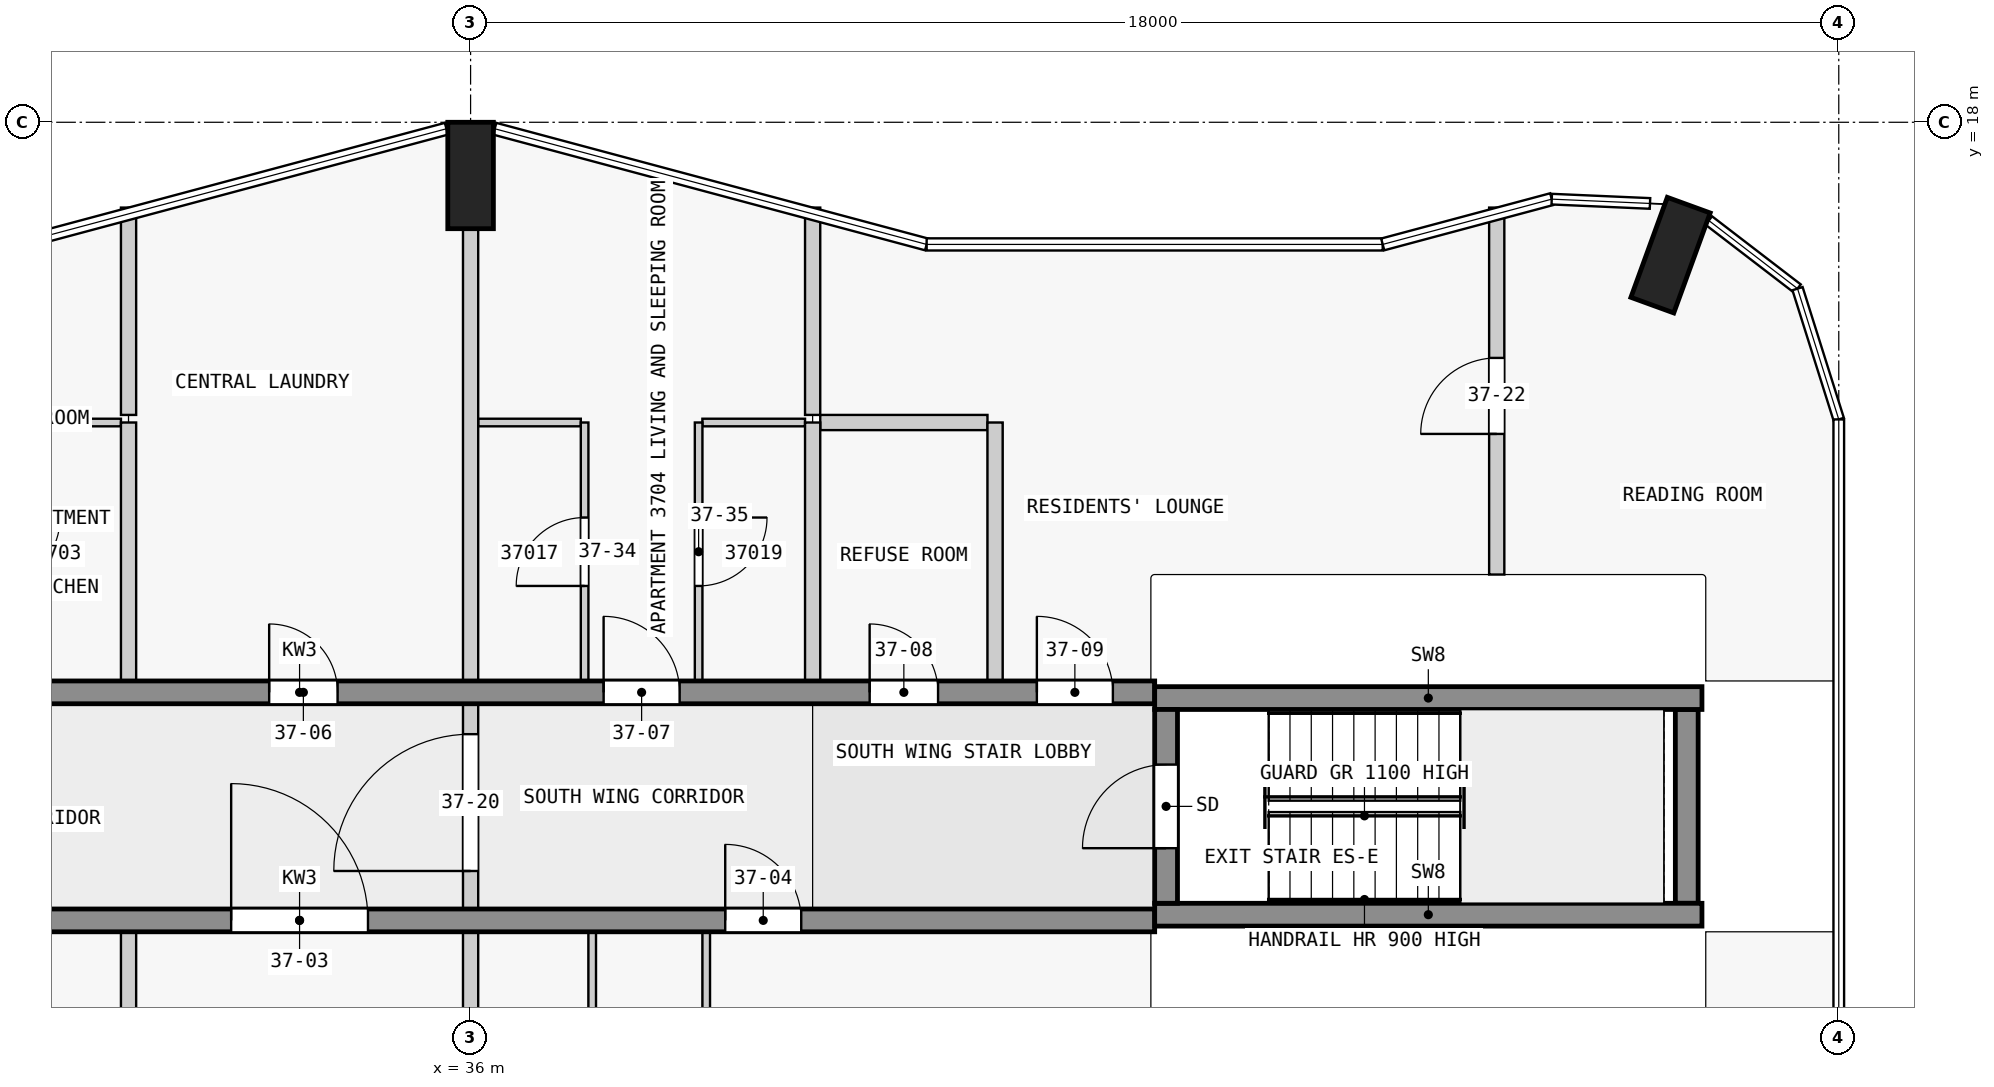
"""IFC4 building model, lengths in metres.
Left out: names, types, materials, properties, quantities, classifications, styles, units other than length and angle.
Written with IfcOpenShell. Run it as: python <this file> out.ifc"""

import sys

from ifc_helpers import new_model, si_unit, direction, frame, frame_2d, origin, origin_2d, place, context, subcontext, project, spatial, rectangle, extrude, element, fill, save


model = new_model("IFC4")
c1 = context("Model", 3, precision=1e-05, world=origin(), true_north=direction((0.0, 1.0)))
c2 = subcontext(c1, "Body", "Model", "MODEL_VIEW")
j1 = project(units=[si_unit("LENGTHUNIT", "METRE"), si_unit("PLANEANGLEUNIT", "RADIAN")], contexts=[c1])
p1 = place(None, origin())
s1 = spatial("IfcSite", under=j1, at=p1, CompositionType="ELEMENT")
p2 = place(p1, origin())
s2 = spatial("IfcBuilding", under=s1, at=p2, CompositionType="ELEMENT")
p3 = place(p2, frame((0.0, 0.0, 146.4)))
s3 = spatial("IfcBuildingStorey", under=s2, at=p3, CompositionType="ELEMENT", Elevation=146.4)
for number, where, z_axis, x_axis in (
    (1, (51.787, 16.252, 0.0), (0.0, 0.0, 1.0), (-0.94, 0.342, 0.0)),
    (2, (36.0, 17.3, 0.0), (0.0, 0.0, 1.0), (1.0, 0.0, 0.0)),
):
    element("IfcColumn", number, at=place(p3, frame(where, z_axis=z_axis, x_axis=x_axis)), inside=s3, PredefinedType="COLUMN", context=c2, shape_type="SweptSolid", body=[
        extrude(rectangle(XDim=0.6, YDim=1.4, at=origin_2d()), origin(), (0.0, 0.0, 1.0), 3.5),
    ])
p4 = place(p3, frame((45.15, 7.725, 0.0), z_axis=(0.0, 0.0, 1.0), x_axis=(0.0, 1.0, 0.0)))
e3 = element("IfcWall", 3, at=p4, inside=s3, PredefinedType="SHEAR", context=c2, shape_type="SweptSolid", body=[
    extrude(rectangle(XDim=2.55, YDim=0.3, at=frame_2d((1.275, 0.0))), origin(), (0.0, 0.0, 1.0), 3.5),
])
p5 = place(p4, frame((0.725, 0.0, 0.0)))
e4 = element("IfcOpeningElement", 4, at=p5, cuts=e3, PredefinedType="OPENING", context=c2, shape_type="SweptSolid", body=[
    extrude(rectangle(XDim=1.1, YDim=2.1, at=frame_2d((0.55, 1.05))), frame((0.0, 0.16, 0.0), z_axis=(0.0, -1.0, 0.0), x_axis=(1.0, 0.0, 0.0)), (0.0, 0.0, 1.0), 0.32),
])
p6 = place(p3, frame((52.0, 7.725, 0.0), z_axis=(0.0, 0.0, 1.0), x_axis=(0.0, 1.0, 0.0)))
e5 = element("IfcWall", 5, at=p6, inside=s3, PredefinedType="SHEAR", context=c2, shape_type="SweptSolid", body=[
    extrude(rectangle(XDim=2.55, YDim=0.3, at=frame_2d((1.275, 0.0))), origin(), (0.0, 0.0, 1.0), 3.5),
])
for number, where, z_axis, x_axis in (
    (6, (45.0, 7.575, 0.0), (0.0, 0.0, 1.0), (1.0, 0.0, 0.0)),
    (7, (45.0, 10.425, 0.0), (0.0, 0.0, 1.0), (1.0, 0.0, 0.0)),
):
    element("IfcWall", number, at=place(p3, frame(where, z_axis=z_axis, x_axis=x_axis)), inside=s3, PredefinedType="SHEAR", context=c2, shape_type="SweptSolid", body=[
        extrude(rectangle(XDim=7.2, YDim=0.3, at=frame_2d((3.6, 0.0))), origin(), (0.0, 0.0, 1.0), 3.5),
    ])
p7 = place(p3, frame((22.5, 7.5, 0.0), z_axis=(0.0, 0.0, 1.0), x_axis=(1.0, 0.0, 0.0)))
e8 = element("IfcWall", 8, at=p7, inside=s3, PredefinedType="SHEAR", context=c2, shape_type="SweptSolid", body=[
    extrude(rectangle(XDim=22.5, YDim=0.3, at=frame_2d((11.25, 0.0))), origin(), (0.0, 0.0, 1.0), 3.25),
])
p8 = place(p7, frame((1.75, 0.0, 0.0)))
e9 = element("IfcOpeningElement", 9, at=p8, cuts=e8, PredefinedType="OPENING", context=c2, shape_type="SweptSolid", body=[
    extrude(rectangle(XDim=1.0, YDim=2.1, at=frame_2d((0.5, 1.05))), frame((0.0, 0.16, 0.0), z_axis=(0.0, -1.0, 0.0), x_axis=(1.0, 0.0, 0.0)), (0.0, 0.0, 1.0), 0.32),
])
p9 = place(p7, frame((6.25, 0.0, 0.0)))
e10 = element("IfcOpeningElement", 10, at=p9, cuts=e8, PredefinedType="OPENING", context=c2, shape_type="SweptSolid", body=[
    extrude(rectangle(XDim=1.0, YDim=2.1, at=frame_2d((0.5, 1.05))), frame((0.0, 0.16, 0.0), z_axis=(0.0, -1.0, 0.0), x_axis=(1.0, 0.0, 0.0)), (0.0, 0.0, 1.0), 0.32),
])
p10 = place(p7, frame((10.35, 0.0, 0.0)))
e11 = element("IfcOpeningElement", 11, at=p10, cuts=e8, PredefinedType="OPENING", context=c2, shape_type="SweptSolid", body=[
    extrude(rectangle(XDim=1.8, YDim=2.1, at=frame_2d((0.9, 1.05))), frame((0.0, 0.16, 0.0), z_axis=(0.0, -1.0, 0.0), x_axis=(1.0, 0.0, 0.0)), (0.0, 0.0, 1.0), 0.32),
])
p11 = place(p7, frame((16.85, 0.0, 0.0)))
e12 = element("IfcOpeningElement", 12, at=p11, cuts=e8, PredefinedType="OPENING", context=c2, shape_type="SweptSolid", body=[
    extrude(rectangle(XDim=1.0, YDim=2.1, at=frame_2d((0.5, 1.05))), frame((0.0, 0.16, 0.0), z_axis=(0.0, -1.0, 0.0), x_axis=(1.0, 0.0, 0.0)), (0.0, 0.0, 1.0), 0.32),
])
p12 = place(p3, frame((22.5, 10.5, 0.0), z_axis=(0.0, 0.0, 1.0), x_axis=(1.0, 0.0, 0.0)))
e13 = element("IfcWall", 13, at=p12, inside=s3, PredefinedType="SHEAR", context=c2, shape_type="SweptSolid", body=[
    extrude(rectangle(XDim=22.5, YDim=0.3, at=frame_2d((11.25, 0.0))), origin(), (0.0, 0.0, 1.0), 3.25),
])
p13 = place(p12, frame((4.05, 0.0, 0.0)))
e14 = element("IfcOpeningElement", 14, at=p13, cuts=e13, PredefinedType="OPENING", context=c2, shape_type="SweptSolid", body=[
    extrude(rectangle(XDim=1.0, YDim=2.1, at=frame_2d((0.5, 1.05))), frame((0.0, 0.16, 0.0), z_axis=(0.0, -1.0, 0.0), x_axis=(1.0, 0.0, 0.0)), (0.0, 0.0, 1.0), 0.32),
])
p14 = place(p12, frame((10.85, 0.0, 0.0)))
e15 = element("IfcOpeningElement", 15, at=p14, cuts=e13, PredefinedType="OPENING", context=c2, shape_type="SweptSolid", body=[
    extrude(rectangle(XDim=0.9, YDim=2.1, at=frame_2d((0.45, 1.05))), frame((0.0, 0.16, 0.0), z_axis=(0.0, -1.0, 0.0), x_axis=(1.0, 0.0, 0.0)), (0.0, 0.0, 1.0), 0.32),
])
p15 = place(p12, frame((15.25, 0.0, 0.0)))
e16 = element("IfcOpeningElement", 16, at=p15, cuts=e13, PredefinedType="OPENING", context=c2, shape_type="SweptSolid", body=[
    extrude(rectangle(XDim=1.0, YDim=2.1, at=frame_2d((0.5, 1.05))), frame((0.0, 0.16, 0.0), z_axis=(0.0, -1.0, 0.0), x_axis=(1.0, 0.0, 0.0)), (0.0, 0.0, 1.0), 0.32),
])
p16 = place(p12, frame((18.75, 0.0, 0.0)))
e17 = element("IfcOpeningElement", 17, at=p16, cuts=e13, PredefinedType="OPENING", context=c2, shape_type="SweptSolid", body=[
    extrude(rectangle(XDim=0.9, YDim=2.1, at=frame_2d((0.45, 1.05))), frame((0.0, 0.16, 0.0), z_axis=(0.0, -1.0, 0.0), x_axis=(1.0, 0.0, 0.0)), (0.0, 0.0, 1.0), 0.32),
])
p17 = place(p12, frame((20.95, 0.0, 0.0)))
e18 = element("IfcOpeningElement", 18, at=p17, cuts=e13, PredefinedType="OPENING", context=c2, shape_type="SweptSolid", body=[
    extrude(rectangle(XDim=1.0, YDim=2.1, at=frame_2d((0.5, 1.05))), frame((0.0, 0.16, 0.0), z_axis=(0.0, -1.0, 0.0), x_axis=(1.0, 0.0, 0.0)), (0.0, 0.0, 1.0), 0.32),
])
p18 = place(p3, frame((31.4, 14.05, 0.0), z_axis=(0.0, 0.0, 1.0), x_axis=(-1.0, 0.0, 0.0)))
e19 = element("IfcWall", 19, at=p18, inside=s3, PredefinedType="PARTITIONING", context=c2, shape_type="SweptSolid", body=[
    extrude(rectangle(XDim=1.65, YDim=0.1, at=frame_2d((0.825, 0.0))), origin(), (0.0, 0.0, 1.0), 3.25),
])
for number, where, z_axis, x_axis in (
    (20, (37.45, 14.05, 0.0), (0.0, 0.0, 1.0), (-1.0, 0.0, 0.0)),
    (21, (40.4, 14.05, 0.0), (0.0, 0.0, 1.0), (-1.0, 0.0, 0.0)),
):
    element("IfcWall", number, at=place(p3, frame(where, z_axis=z_axis, x_axis=x_axis)), inside=s3, PredefinedType="PARTITIONING", context=c2, shape_type="SweptSolid", body=[
        extrude(rectangle(XDim=1.35, YDim=0.1, at=frame_2d((0.675, 0.0))), origin(), (0.0, 0.0, 1.0), 3.25),
    ])
p19 = place(p3, frame((42.8, 14.05, 0.0), z_axis=(0.0, 0.0, 1.0), x_axis=(-1.0, 0.0, 0.0)))
e22 = element("IfcWall", 22, at=p19, inside=s3, PredefinedType="PARTITIONING", context=c2, shape_type="SweptSolid", body=[
    extrude(rectangle(XDim=2.2, YDim=0.2, at=frame_2d((1.1, 0.0))), origin(), (0.0, 0.0, 1.0), 3.25),
])
p20 = place(p3, frame((31.5, 16.878, 0.0), z_axis=(0.0, 0.0, 1.0), x_axis=(0.0, -1.0, 0.0)))
e23 = element("IfcWall", 23, at=p20, inside=s3, PredefinedType="PARTITIONING", context=c2, shape_type="SweptSolid", body=[
    extrude(rectangle(XDim=2.728, YDim=0.2, at=frame_2d((1.364, 0.0))), origin(), (0.0, 0.0, 1.0), 3.25),
])
for number, where, z_axis, x_axis in (
    (24, (31.5, 3.95, 0.0), (0.0, 0.0, 1.0), (0.0, 1.0, 0.0)),
    (25, (31.5, 10.65, 0.0), (0.0, 0.0, 1.0), (0.0, 1.0, 0.0)),
):
    element("IfcWall", number, at=place(p3, frame(where, z_axis=z_axis, x_axis=x_axis)), inside=s3, PredefinedType="PARTITIONING", context=c2, shape_type="SweptSolid", body=[
        extrude(rectangle(XDim=3.4, YDim=0.2, at=frame_2d((1.7, 0.0))), origin(), (0.0, 0.0, 1.0), 3.25),
    ])
for number, where, z_axis, x_axis in (
    (26, (36.0, 1.4, 0.0), (0.0, 0.0, 1.0), (0.0, 1.0, 0.0)),
    (27, (36.0, 10.65, 0.0), (0.0, 0.0, 1.0), (0.0, 1.0, 0.0)),
):
    element("IfcWall", number, at=place(p3, frame(where, z_axis=z_axis, x_axis=x_axis)), inside=s3, PredefinedType="PARTITIONING", context=c2, shape_type="SweptSolid", body=[
        extrude(rectangle(XDim=5.95, YDim=0.2, at=frame_2d((2.975, 0.0))), origin(), (0.0, 0.0, 1.0), 3.25),
    ])
p21 = place(p3, frame((37.5, 10.65, 0.0), z_axis=(0.0, 0.0, 1.0), x_axis=(0.0, 1.0, 0.0)))
e28 = element("IfcWall", 28, at=p21, inside=s3, PredefinedType="PARTITIONING", context=c2, shape_type="SweptSolid", body=[
    extrude(rectangle(XDim=3.4, YDim=0.1, at=frame_2d((1.7, 0.0))), origin(), (0.0, 0.0, 1.0), 3.25),
])
p22 = place(p21, frame((1.25, 0.0, 0.0)))
e29 = element("IfcOpeningElement", 29, at=p22, cuts=e28, PredefinedType="OPENING", context=c2, shape_type="SweptSolid", body=[
    extrude(rectangle(XDim=0.9, YDim=2.1, at=frame_2d((0.45, 1.05))), frame((0.0, 0.06, 0.0), z_axis=(0.0, -1.0, 0.0), x_axis=(1.0, 0.0, 0.0)), (0.0, 0.0, 1.0), 0.12),
])
p23 = place(p3, frame((37.6, 3.95, 0.0), z_axis=(0.0, 0.0, 1.0), x_axis=(0.0, 1.0, 0.0)))
e30 = element("IfcWall", 30, at=p23, inside=s3, PredefinedType="PARTITIONING", context=c2, shape_type="SweptSolid", body=[
    extrude(rectangle(XDim=3.4, YDim=0.1, at=frame_2d((1.7, 0.0))), origin(), (0.0, 0.0, 1.0), 3.25),
])
p24 = place(p3, frame((39.0, 14.05, 0.0), z_axis=(0.0, 0.0, 1.0), x_axis=(0.0, -1.0, 0.0)))
e31 = element("IfcWall", 31, at=p24, inside=s3, PredefinedType="PARTITIONING", context=c2, shape_type="SweptSolid", body=[
    extrude(rectangle(XDim=3.4, YDim=0.1, at=frame_2d((1.7, 0.0))), origin(), (0.0, 0.0, 1.0), 3.25),
])
p25 = place(p24, frame((1.25, 0.0, 0.0)))
e32 = element("IfcOpeningElement", 32, at=p25, cuts=e31, PredefinedType="OPENING", context=c2, shape_type="SweptSolid", body=[
    extrude(rectangle(XDim=0.9, YDim=2.1, at=frame_2d((0.45, 1.05))), frame((0.0, 0.06, 0.0), z_axis=(0.0, -1.0, 0.0), x_axis=(1.0, 0.0, 0.0)), (0.0, 0.0, 1.0), 0.12),
])
p26 = place(p3, frame((39.1, 3.95, 0.0), z_axis=(0.0, 0.0, 1.0), x_axis=(0.0, 1.0, 0.0)))
e33 = element("IfcWall", 33, at=p26, inside=s3, PredefinedType="PARTITIONING", context=c2, shape_type="SweptSolid", body=[
    extrude(rectangle(XDim=3.4, YDim=0.1, at=frame_2d((1.7, 0.0))), origin(), (0.0, 0.0, 1.0), 3.25),
])
p27 = place(p26, frame((1.25, 0.0, 0.0)))
e34 = element("IfcOpeningElement", 34, at=p27, cuts=e33, PredefinedType="OPENING", context=c2, shape_type="SweptSolid", body=[
    extrude(rectangle(XDim=0.9, YDim=2.1, at=frame_2d((0.45, 1.05))), frame((0.0, 0.06, 0.0), z_axis=(0.0, -1.0, 0.0), x_axis=(1.0, 0.0, 0.0)), (0.0, 0.0, 1.0), 0.12),
])
p28 = place(p3, frame((40.5, 16.878, 0.0), z_axis=(0.0, 0.0, 1.0), x_axis=(0.0, -1.0, 0.0)))
e35 = element("IfcWall", 35, at=p28, inside=s3, PredefinedType="PARTITIONING", context=c2, shape_type="SweptSolid", body=[
    extrude(rectangle(XDim=2.728, YDim=0.2, at=frame_2d((1.364, 0.0))), origin(), (0.0, 0.0, 1.0), 3.25),
])
for number, where, z_axis, x_axis in (
    (36, (40.5, 10.65, 0.0), (0.0, 0.0, 1.0), (0.0, 1.0, 0.0)),
    (37, (42.9, 10.65, 0.0), (0.0, 0.0, 1.0), (0.0, 1.0, 0.0)),
):
    element("IfcWall", number, at=place(p3, frame(where, z_axis=z_axis, x_axis=x_axis)), inside=s3, PredefinedType="PARTITIONING", context=c2, shape_type="SweptSolid", body=[
        extrude(rectangle(XDim=3.4, YDim=0.2, at=frame_2d((1.7, 0.0))), origin(), (0.0, 0.0, 1.0), 3.25),
    ])
p29 = place(p3, frame((49.5, 12.05, 0.0), z_axis=(0.0, 0.0, 1.0), x_axis=(0.0, 1.0, 0.0)))
e38 = element("IfcWall", 38, at=p29, inside=s3, PredefinedType="PARTITIONING", context=c2, shape_type="SweptSolid", body=[
    extrude(rectangle(XDim=4.828, YDim=0.2, at=frame_2d((2.414, 0.0))), origin(), (0.0, 0.0, 1.0), 3.25),
])
p30 = place(p29, frame((1.85, 0.0, 0.0)))
e39 = element("IfcOpeningElement", 39, at=p30, cuts=e38, PredefinedType="OPENING", context=c2, shape_type="SweptSolid", body=[
    extrude(rectangle(XDim=1.0, YDim=2.1, at=frame_2d((0.5, 1.05))), frame((0.0, 0.11, 0.0), z_axis=(0.0, -1.0, 0.0), x_axis=(1.0, 0.0, 0.0)), (0.0, 0.0, 1.0), 0.22),
])
p31 = place(p3, frame((36.0, 7.45, 0.0), z_axis=(0.0, 0.0, 1.0), x_axis=(0.0, 1.0, 0.0)))
e40 = element("IfcWall", 40, at=p31, inside=s3, PredefinedType="PARTITIONING", context=c2, shape_type="SweptSolid", body=[
    extrude(rectangle(XDim=3.1, YDim=0.2, at=frame_2d((1.55, 0.0))), origin(), (0.0, 0.0, 1.0), 3.25),
])
p32 = place(p31, frame((0.7, 0.0, 0.0)))
e41 = element("IfcOpeningElement", 41, at=p32, cuts=e40, PredefinedType="OPENING", context=c2, shape_type="SweptSolid", body=[
    extrude(rectangle(XDim=1.8, YDim=2.1, at=frame_2d((0.9, 1.05))), frame((0.0, 0.11, 0.0), z_axis=(0.0, -1.0, 0.0), x_axis=(1.0, 0.0, 0.0)), (0.0, 0.0, 1.0), 0.22),
])
p33 = place(p5, origin())
e42 = element("IfcDoor", 42, at=p33, inside=s3, OperationType="SINGLE_SWING_LEFT", PredefinedType="DOOR", context=c2, shape_type="SweptSolid", body=[
    extrude(rectangle(XDim=1.1, YDim=2.1, at=frame_2d((0.55, 1.05))), frame((0.0, 0.025, 0.0), z_axis=(0.0, -1.0, 0.0), x_axis=(1.0, 0.0, 0.0)), (0.0, 0.0, 1.0), 0.05),
])
fill(e4, e42)
p34 = place(p10, origin())
e43 = element("IfcDoor", 43, at=p34, inside=s3, OperationType="SINGLE_SWING_LEFT", PredefinedType="DOOR", context=c2, shape_type="SweptSolid", body=[
    extrude(rectangle(XDim=1.8, YDim=2.1, at=frame_2d((0.9, 1.05))), frame((0.0, 0.025, 0.0), z_axis=(0.0, -1.0, 0.0), x_axis=(1.0, 0.0, 0.0)), (0.0, 0.0, 1.0), 0.05),
])
fill(e11, e43)
p35 = place(p11, origin())
e44 = element("IfcDoor", 44, at=p35, inside=s3, OperationType="SINGLE_SWING_RIGHT", PredefinedType="DOOR", context=c2, shape_type="SweptSolid", body=[
    extrude(rectangle(XDim=1.0, YDim=2.1, at=frame_2d((0.5, 1.05))), frame((0.0, 0.025, 0.0), z_axis=(0.0, -1.0, 0.0), x_axis=(1.0, 0.0, 0.0)), (0.0, 0.0, 1.0), 0.05),
])
fill(e12, e44)
p36 = place(p14, origin())
e45 = element("IfcDoor", 45, at=p36, inside=s3, OperationType="SINGLE_SWING_RIGHT", PredefinedType="DOOR", context=c2, shape_type="SweptSolid", body=[
    extrude(rectangle(XDim=0.9, YDim=2.1, at=frame_2d((0.45, 1.05))), frame((0.0, 0.025, 0.0), z_axis=(0.0, -1.0, 0.0), x_axis=(1.0, 0.0, 0.0)), (0.0, 0.0, 1.0), 0.05),
])
fill(e15, e45)
p37 = place(p15, origin())
e46 = element("IfcDoor", 46, at=p37, inside=s3, OperationType="SINGLE_SWING_RIGHT", PredefinedType="DOOR", context=c2, shape_type="SweptSolid", body=[
    extrude(rectangle(XDim=1.0, YDim=2.1, at=frame_2d((0.5, 1.05))), frame((0.0, 0.025, 0.0), z_axis=(0.0, -1.0, 0.0), x_axis=(1.0, 0.0, 0.0)), (0.0, 0.0, 1.0), 0.05),
])
fill(e16, e46)
p38 = place(p16, origin())
e47 = element("IfcDoor", 47, at=p38, inside=s3, OperationType="SINGLE_SWING_RIGHT", PredefinedType="DOOR", context=c2, shape_type="SweptSolid", body=[
    extrude(rectangle(XDim=0.9, YDim=2.1, at=frame_2d((0.45, 1.05))), frame((0.0, 0.025, 0.0), z_axis=(0.0, -1.0, 0.0), x_axis=(1.0, 0.0, 0.0)), (0.0, 0.0, 1.0), 0.05),
])
fill(e17, e47)
p39 = place(p17, origin())
e48 = element("IfcDoor", 48, at=p39, inside=s3, OperationType="SINGLE_SWING_RIGHT", PredefinedType="DOOR", context=c2, shape_type="SweptSolid", body=[
    extrude(rectangle(XDim=1.0, YDim=2.1, at=frame_2d((0.5, 1.05))), frame((0.0, 0.025, 0.0), z_axis=(0.0, -1.0, 0.0), x_axis=(1.0, 0.0, 0.0)), (0.0, 0.0, 1.0), 0.05),
])
fill(e18, e48)
p40 = place(p32, origin())
e49 = element("IfcDoor", 49, at=p40, inside=s3, OperationType="SINGLE_SWING_RIGHT", PredefinedType="DOOR", context=c2, shape_type="SweptSolid", body=[
    extrude(rectangle(XDim=1.8, YDim=2.1, at=frame_2d((0.9, 1.05))), frame((0.0, 0.025, 0.0), z_axis=(0.0, -1.0, 0.0), x_axis=(1.0, 0.0, 0.0)), (0.0, 0.0, 1.0), 0.05),
])
fill(e41, e49)
p41 = place(p30, origin())
e50 = element("IfcDoor", 50, at=p41, inside=s3, OperationType="SINGLE_SWING_LEFT", PredefinedType="DOOR", context=c2, shape_type="SweptSolid", body=[
    extrude(rectangle(XDim=1.0, YDim=2.1, at=frame_2d((0.5, 1.05))), frame((0.0, 0.025, 0.0), z_axis=(0.0, -1.0, 0.0), x_axis=(1.0, 0.0, 0.0)), (0.0, 0.0, 1.0), 0.05),
])
fill(e39, e50)
p42 = place(p22, origin())
e51 = element("IfcDoor", 51, at=p42, inside=s3, OperationType="SINGLE_SWING_LEFT", PredefinedType="DOOR", context=c2, shape_type="SweptSolid", body=[
    extrude(rectangle(XDim=0.9, YDim=2.1, at=frame_2d((0.45, 1.05))), frame((0.0, 0.025, 0.0), z_axis=(0.0, -1.0, 0.0), x_axis=(1.0, 0.0, 0.0)), (0.0, 0.0, 1.0), 0.05),
])
fill(e29, e51)
p43 = place(p25, origin())
e52 = element("IfcDoor", 52, at=p43, inside=s3, OperationType="SINGLE_SWING_LEFT", PredefinedType="DOOR", context=c2, shape_type="SweptSolid", body=[
    extrude(rectangle(XDim=0.9, YDim=2.1, at=frame_2d((0.45, 1.05))), frame((0.0, 0.025, 0.0), z_axis=(0.0, -1.0, 0.0), x_axis=(1.0, 0.0, 0.0)), (0.0, 0.0, 1.0), 0.05),
])
fill(e32, e52)
save(model, sys.argv[1])
